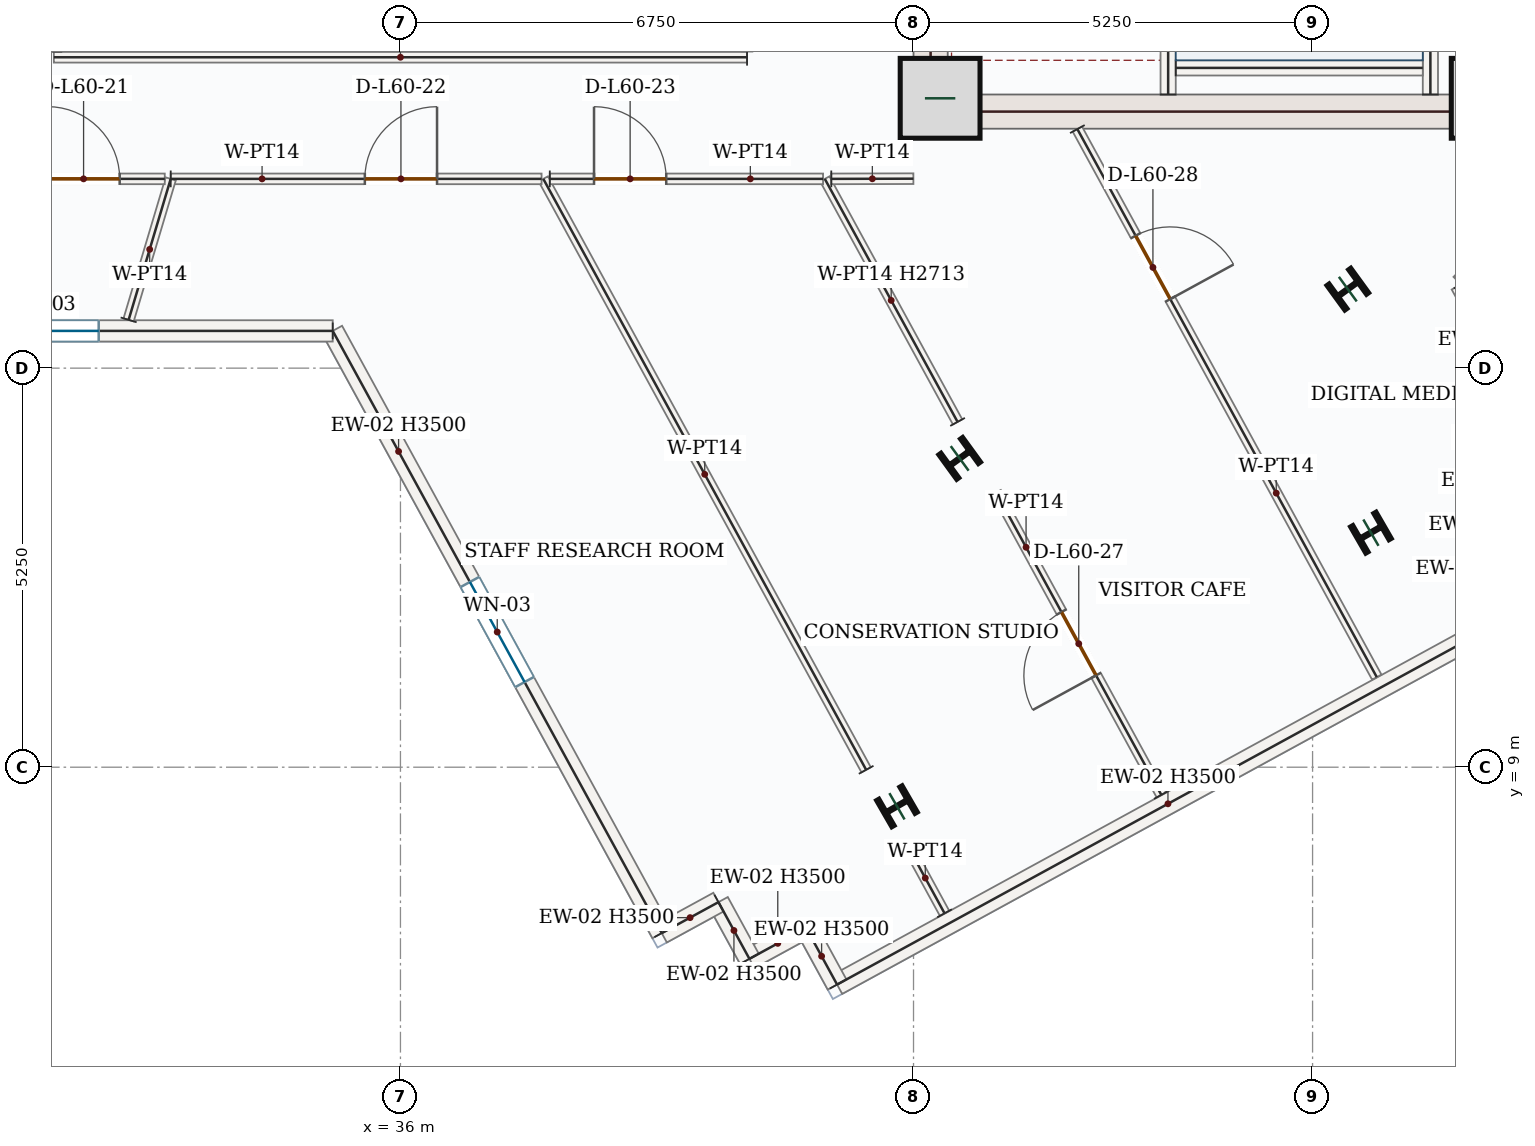
"""IFC4 building model, lengths in metres.
Left out: names, types, materials, properties, quantities, classifications, styles, units other than length and angle.
Written with IfcOpenShell. Run it as: python <this file> out.ifc"""

import sys

from ifc_helpers import new_model, si_unit, direction, frame, frame_2d, origin, origin_2d, place, context, subcontext, project, spatial, rectangle, i_section, extrude, source, transform, mapped, element, fill, save


model = new_model("IFC4")
c1 = context("Model", 3, precision=1e-05, world=origin(), true_north=direction((0.0, 1.0)))
c2 = subcontext(c1, "Body", "Model", "MODEL_VIEW")
j1 = project(units=[si_unit("LENGTHUNIT", "METRE"), si_unit("PLANEANGLEUNIT", "RADIAN")], contexts=[c1])
p1 = place(None, origin())
s1 = spatial("IfcSite", under=j1, at=p1, CompositionType="ELEMENT")
p2 = place(p1, origin())
s2 = spatial("IfcBuilding", under=s1, at=p2, CompositionType="ELEMENT")
p3 = place(p2, frame((0.0, 0.0, 254.1)))
s3 = spatial("IfcBuildingStorey", under=s2, at=p3, CompositionType="ELEMENT", Elevation=254.1)
p4 = place(p3, frame((42.975, 17.4, 0.0), z_axis=(0.0, 0.0, 1.0), x_axis=(0.0, 1.0, 0.0)))
e1 = element("IfcWall", 1, at=p4, inside=s3, PredefinedType="SHEAR", context=c2, shape_type="SweptSolid", body=[
    extrude(rectangle(XDim=8.55, YDim=0.45, at=frame_2d((4.275, 0.0))), origin(), (0.0, 0.0, 1.0), 3.5),
])
p5 = place(p4, frame((6.65, 0.0, 0.0)))
e2 = element("IfcOpeningElement", 2, at=p5, cuts=e1, PredefinedType="OPENING", context=c2, shape_type="SweptSolid", body=[
    extrude(rectangle(XDim=1.1, YDim=2.2, at=frame_2d((0.55, 1.1))), frame((0.0, 0.235, 0.0), z_axis=(0.0, -1.0, 0.0), x_axis=(1.0, 0.0, 0.0)), (0.0, 0.0, 1.0), 0.47),
])
p6 = place(p4, frame((1.75, 0.0, 0.0)))
e3 = element("IfcOpeningElement", 3, at=p6, cuts=e1, PredefinedType="OPENING", context=c2, shape_type="SweptSolid", body=[
    extrude(rectangle(XDim=1.3, YDim=2.2, at=frame_2d((0.65, 1.1))), frame((0.0, 0.235, 0.0), z_axis=(0.0, -1.0, 0.0), x_axis=(1.0, 0.0, 0.0)), (0.0, 0.0, 1.0), 0.47),
])
p7 = place(p4, frame((4.55, 0.0, 0.0)))
e4 = element("IfcOpeningElement", 4, at=p7, cuts=e1, PredefinedType="OPENING", context=c2, shape_type="SweptSolid", body=[
    extrude(rectangle(XDim=0.88, YDim=2.1, at=frame_2d((0.44, 1.05))), frame((0.0, 0.235, 0.0), z_axis=(0.0, -1.0, 0.0), x_axis=(1.0, 0.0, 0.0)), (0.0, 0.0, 1.0), 0.47),
])
m1 = source(origin(), c2, "Body", "SweptSolid", [
    extrude(rectangle(XDim=7.1, YDim=0.45, at=frame_2d((3.55, 0.0))), origin(), (0.0, 0.0, 1.0), 3.5),
])
p8 = place(p3, frame((43.2, 17.625, 0.0), z_axis=(0.0, 0.0, 1.0), x_axis=(1.0, 0.0, 0.0)))
e5 = element("IfcWall", 5, at=p8, inside=s3, PredefinedType="SHEAR", context=c2, shape_type="MappedRepresentation", body=[
    mapped(m1, transform((0.0, 0.0, 0.0), x_axis=(1.0, 0.0, 0.0), y_axis=(0.0, 1.0, 0.0), z_axis=(0.0, 0.0, 1.0), scale=1.0)),
])
m2 = source(origin(), c2, "Body", "SweptSolid", [
    extrude(rectangle(XDim=1.05, YDim=1.05, at=origin_2d()), origin(), (0.0, 0.0, 1.0), 3.75),
])
for number, where, z_axis, x_axis in (
    (6, (43.1, 17.8, 0.0), (0.0, 0.0, 1.0), (1.0, 0.0, 0.0)),
    (7, (50.35, 17.8, 0.0), (0.0, 0.0, 1.0), (1.0, 0.0, 0.0)),
):
    element("IfcColumn", number, at=place(p3, frame(where, z_axis=z_axis, x_axis=x_axis)), inside=s3, PredefinedType="COLUMN", context=c2, shape_type="MappedRepresentation", body=[
        mapped(m2, transform((0.0, 0.0, 0.0), x_axis=(1.0, 0.0, 0.0), y_axis=(0.0, 1.0, 0.0), z_axis=(0.0, 0.0, 1.0), scale=1.0)),
    ])
m3 = source(origin(), c2, "Body", "SweptSolid", [
    extrude(i_section(OverallWidth=0.399, OverallDepth=0.386, WebThickness=0.021, FlangeThickness=0.033, FilletRadius=0.018, at=origin_2d()), origin(), (0.0, 0.0, 1.0), 3.75),
])
for number, where, z_axis, x_axis in (
    (8, (43.357, 13.063, 0.0), (0.0, 0.0, 1.0), (-0.588, 0.809, 0.0)),
    (9, (48.464, 15.289, 0.0), (0.0, 0.0, 1.0), (-0.588, 0.809, 0.0)),
    (10, (42.532, 8.486, 0.0), (0.0, 0.0, 1.0), (-0.5, 0.866, 0.0)),
    (11, (48.768, 12.086, 0.0), (0.0, 0.0, 1.0), (-0.5, 0.866, 0.0)),
):
    element("IfcColumn", number, at=place(p3, frame(where, z_axis=z_axis, x_axis=x_axis)), inside=s3, PredefinedType="COLUMN", context=c2, shape_type="MappedRepresentation", body=[
        mapped(m3, transform((0.0, 0.0, 0.0), x_axis=(1.0, 0.0, 0.0), y_axis=(0.0, 1.0, 0.0), z_axis=(0.0, 0.0, 1.0), scale=1.0)),
    ])
p9 = place(p3, frame((53.06, 18.458, 0.0), z_axis=(0.0, 0.0, 1.0), x_axis=(-0.707106781187, -0.707106781187, 0.0)))
e12 = element("IfcWall", 12, at=p9, inside=s3, PredefinedType="SOLIDWALL", context=c2, shape_type="SweptSolid", body=[
    extrude(rectangle(XDim=4.394, YDim=0.28, at=frame_2d((2.197, 0.0))), origin(), (0.0, 0.0, 1.0), 3.5),
])
p10 = place(p9, frame((1.447, 0.0, 0.85)))
e13 = element("IfcOpeningElement", 13, at=p10, cuts=e12, PredefinedType="OPENING", context=c2, shape_type="SweptSolid", body=[
    extrude(rectangle(XDim=1.5, YDim=1.5, at=frame_2d((0.75, 0.75))), frame((0.0, 0.15, 0.0), z_axis=(0.0, -1.0, 0.0), x_axis=(1.0, 0.0, 0.0)), (0.0, 0.0, 1.0), 0.3),
])
m4 = source(origin(), c2, "Body", "SweptSolid", [
    extrude(rectangle(XDim=2.448, YDim=0.28, at=frame_2d((1.224, 0.0))), origin(), (0.0, 0.0, 1.0), 3.5),
])
p11 = place(p3, frame((49.953, 15.351, 0.0), z_axis=(0.0, 0.0, 1.0), x_axis=(0.47951595933, -0.877533158774, 0.0)))
e14 = element("IfcWall", 14, at=p11, inside=s3, PredefinedType="SOLIDWALL", context=c2, shape_type="MappedRepresentation", body=[
    mapped(m4, transform((0.0, 0.0, 0.0), x_axis=(1.0, 0.0, 0.0), y_axis=(0.0, 1.0, 0.0), z_axis=(0.0, 0.0, 1.0), scale=1.0)),
])
m5 = source(origin(), c2, "Body", "SweptSolid", [
    extrude(rectangle(XDim=9.92, YDim=0.28, at=frame_2d((4.96, 0.0))), origin(), (0.0, 0.0, 1.0), 3.5),
])
p12 = place(p3, frame((50.45, 10.896, 0.0), z_axis=(0.0, 0.0, 1.0), x_axis=(-0.877572768104, -0.479443465574, 0.0)))
e15 = element("IfcWall", 15, at=p12, inside=s3, PredefinedType="SOLIDWALL", context=c2, shape_type="MappedRepresentation", body=[
    mapped(m5, transform((0.0, 0.0, 0.0), x_axis=(1.0, 0.0, 0.0), y_axis=(0.0, 1.0, 0.0), z_axis=(0.0, 0.0, 1.0), scale=1.0)),
])
m6 = source(origin(), c2, "Body", "SweptSolid", [
    extrude(rectangle(XDim=0.85, YDim=0.28, at=frame_2d((0.425, 0.0))), origin(), (0.0, 0.0, 1.0), 3.5),
])
for number, where, z_axis, x_axis in (
    (16, (41.745, 6.14, 0.0), (0.0, 0.0, 1.0), (-0.479, 0.878, 0.0)),
    (17, (41.337, 6.886, 0.0), (0.0, 0.0, 1.0), (-0.878, -0.479, 0.0)),
):
    element("IfcWall", number, at=place(p3, frame(where, z_axis=z_axis, x_axis=x_axis)), inside=s3, PredefinedType="SOLIDWALL", context=c2, shape_type="MappedRepresentation", body=[
        mapped(m6, transform((0.0, 0.0, 0.0), x_axis=(1.0, 0.0, 0.0), y_axis=(0.0, 1.0, 0.0), z_axis=(0.0, 0.0, 1.0), scale=1.0)),
    ])
m7 = source(origin(), c2, "Body", "SweptSolid", [
    extrude(rectangle(XDim=0.85, YDim=0.28, at=frame_2d((0.425, 0.0))), origin(), (0.0, 0.0, 1.0), 3.5),
])
p13 = place(p3, frame((40.591, 6.479, 0.0), z_axis=(0.0, 0.0, 1.0), x_axis=(-0.479656876283, 0.877456141943, 0.0)))
e18 = element("IfcWall", 18, at=p13, inside=s3, PredefinedType="SOLIDWALL", context=c2, shape_type="MappedRepresentation", body=[
    mapped(m7, transform((0.0, 0.0, 0.0), x_axis=(1.0, 0.0, 0.0), y_axis=(0.0, 1.0, 0.0), z_axis=(0.0, 0.0, 1.0), scale=1.0)),
])
p14 = place(p3, frame((40.184, 7.225, 0.0), z_axis=(0.0, 0.0, 1.0), x_axis=(-0.877577015132, -0.479435691737, 0.0)))
e19 = element("IfcWall", 19, at=p14, inside=s3, PredefinedType="SOLIDWALL", context=c2, shape_type="MappedRepresentation", body=[
    mapped(m6, transform((0.0, 0.0, 0.0), x_axis=(1.0, 0.0, 0.0), y_axis=(0.0, 1.0, 0.0), z_axis=(0.0, 0.0, 1.0), scale=1.0)),
])
p15 = place(p3, frame((39.438, 6.817, 0.0), z_axis=(0.0, 0.0, 1.0), x_axis=(-0.479475345647, 0.877555350344, 0.0)))
e20 = element("IfcWall", 20, at=p15, inside=s3, PredefinedType="SOLIDWALL", context=c2, shape_type="SweptSolid", body=[
    extrude(rectangle(XDim=9.028, YDim=0.28, at=frame_2d((4.514, 0.0))), origin(), (0.0, 0.0, 1.0), 3.5),
])
p16 = place(p15, frame((3.764, 0.0, 0.85)))
e21 = element("IfcOpeningElement", 21, at=p16, cuts=e20, PredefinedType="OPENING", context=c2, shape_type="SweptSolid", body=[
    extrude(rectangle(XDim=1.5, YDim=1.5, at=frame_2d((0.75, 0.75))), frame((0.0, 0.15, 0.0), z_axis=(0.0, -1.0, 0.0), x_axis=(1.0, 0.0, 0.0)), (0.0, 0.0, 1.0), 0.3),
])
p17 = place(p3, frame((35.109, 14.74, 0.0), z_axis=(0.0, 0.0, 1.0), x_axis=(-1.0, 0.0, 0.0)))
e22 = element("IfcWall", 22, at=p17, inside=s3, PredefinedType="SOLIDWALL", context=c2, shape_type="SweptSolid", body=[
    extrude(rectangle(XDim=7.658, YDim=0.28, at=frame_2d((3.829, 0.0))), origin(), (0.0, 0.0, 1.0), 2.772),
])
p18 = place(p17, frame((3.079, 0.0, 0.85)))
e23 = element("IfcOpeningElement", 23, at=p18, cuts=e22, PredefinedType="OPENING", context=c2, shape_type="SweptSolid", body=[
    extrude(rectangle(XDim=1.5, YDim=1.5, at=frame_2d((0.75, 0.75))), frame((0.0, 0.15, 0.0), z_axis=(0.0, -1.0, 0.0), x_axis=(1.0, 0.0, 0.0)), (0.0, 0.0, 1.0), 0.3),
])
m8 = source(origin(), c2, "Body", "SweptSolid", [
    extrude(rectangle(XDim=7.87, YDim=0.2, at=frame_2d((3.935, 0.0))), origin(), (0.0, 0.0, 1.0), 3.5),
])
p19 = place(p3, frame((49.55, 17.85, 0.0), z_axis=(0.0, 0.0, 1.0), x_axis=(0.0, 1.0, 0.0)))
e24 = element("IfcWall", 24, at=p19, inside=s3, PredefinedType="SOLIDWALL", context=c2, shape_type="MappedRepresentation", body=[
    mapped(m8, transform((0.0, 0.0, 0.0), x_axis=(1.0, 0.0, 0.0), y_axis=(0.0, 1.0, 0.0), z_axis=(0.0, 0.0, 1.0), scale=1.0)),
])
p20 = place(p3, frame((46.1, 17.85, 0.0), z_axis=(0.0, 0.0, 1.0), x_axis=(0.0, 1.0, 0.0)))
e25 = element("IfcWall", 25, at=p20, inside=s3, PredefinedType="SOLIDWALL", context=c2, shape_type="SweptSolid", body=[
    extrude(rectangle(XDim=8.0, YDim=0.2, at=frame_2d((4.0, 0.0))), origin(), (0.0, 0.0, 1.0), 3.5),
])
p21 = place(p20, frame((6.3, 0.0, 0.0)))
e26 = element("IfcOpeningElement", 26, at=p21, cuts=e25, PredefinedType="OPENING", context=c2, shape_type="SweptSolid", body=[
    extrude(rectangle(XDim=1.05, YDim=2.15, at=frame_2d((0.525, 1.075))), frame((0.0, 0.11, 0.0), z_axis=(0.0, -1.0, 0.0), x_axis=(1.0, 0.0, 0.0)), (0.0, 0.0, 1.0), 0.22),
])
m9 = source(origin(), c2, "Body", "SweptSolid", [
    extrude(rectangle(XDim=3.25, YDim=0.2, at=frame_2d((1.625, 0.0))), origin(), (0.0, 0.0, 1.0), 3.5),
])
p22 = place(p3, frame((46.2, 18.2, 0.0), z_axis=(0.0, 0.0, 1.0), x_axis=(1.0, 0.0, 0.0)))
e27 = element("IfcWall", 27, at=p22, inside=s3, PredefinedType="SOLIDWALL", context=c2, shape_type="MappedRepresentation", body=[
    mapped(m9, transform((0.0, 0.0, 0.0), x_axis=(1.0, 0.0, 0.0), y_axis=(0.0, 1.0, 0.0), z_axis=(0.0, 0.0, 1.0), scale=1.0)),
])
p23 = place(p3, frame((44.906, 17.395, 0.0), z_axis=(0.0, 0.0, 1.0), x_axis=(0.479449534835, -0.877569452264, 0.0)))
e28 = element("IfcWall", 28, at=p23, inside=s3, PredefinedType="PARTITIONING", context=c2, shape_type="SweptSolid", body=[
    extrude(rectangle(XDim=8.216, YDim=0.14, at=frame_2d((4.108, 0.0))), origin(), (0.0, 0.0, 1.0), 3.5),
])
p24 = place(p23, frame((1.599, 0.0, 0.0)))
e29 = element("IfcOpeningElement", 29, at=p24, cuts=e28, PredefinedType="OPENING", context=c2, shape_type="SweptSolid", body=[
    extrude(rectangle(XDim=0.95, YDim=2.15, at=frame_2d((0.475, 1.075))), frame((0.0, 0.08, 0.0), z_axis=(0.0, -1.0, 0.0), x_axis=(1.0, 0.0, 0.0)), (0.0, 0.0, 1.0), 0.16),
])
p25 = place(p3, frame((46.01, 8.636, 0.0), z_axis=(0.0, 0.0, 1.0), x_axis=(-0.479410597023, 0.877590724348, 0.0)))
e30 = element("IfcWall", 30, at=p25, inside=s3, PredefinedType="PARTITIONING", context=c2, shape_type="SweptSolid", body=[
    extrude(rectangle(XDim=4.532, YDim=0.14, at=frame_2d((2.266, 0.0))), origin(), (0.0, 0.0, 1.0), 3.5),
])
p26 = place(p25, frame((1.791, 0.0, 0.0)))
e31 = element("IfcOpeningElement", 31, at=p26, cuts=e30, PredefinedType="OPENING", context=c2, shape_type="SweptSolid", body=[
    extrude(rectangle(XDim=0.95, YDim=2.15, at=frame_2d((0.475, 1.075))), frame((0.0, 0.08, 0.0), z_axis=(0.0, -1.0, 0.0), x_axis=(1.0, 0.0, 0.0)), (0.0, 0.0, 1.0), 0.16),
])
m10 = source(origin(), c2, "Body", "SweptSolid", [
    extrude(rectangle(XDim=3.643, YDim=0.14, at=frame_2d((1.822, 0.0))), origin(), (0.0, 0.0, 1.0), 2.713),
])
p27 = place(p3, frame((43.33, 13.543, 0.0), z_axis=(0.0, 0.0, 1.0), x_axis=(-0.479434255723, 0.87757779965, 0.0)))
e32 = element("IfcWall", 32, at=p27, inside=s3, PredefinedType="PARTITIONING", context=c2, shape_type="MappedRepresentation", body=[
    mapped(m10, transform((0.0, 0.0, 0.0), x_axis=(1.0, 0.0, 0.0), y_axis=(0.0, 1.0, 0.0), z_axis=(0.0, 0.0, 1.0), scale=1.0)),
])
m11 = source(origin(), c2, "Body", "SweptSolid", [
    extrude(rectangle(XDim=1.08, YDim=0.14, at=frame_2d((0.54, 0.0))), origin(), (0.0, 0.0, 1.0), 3.5),
])
p28 = place(p3, frame((41.668, 16.74, 0.0), z_axis=(0.0, 0.0, 1.0), x_axis=(0.999996908828, 0.002486429927, 0.0)))
e33 = element("IfcWall", 33, at=p28, inside=s3, PredefinedType="PARTITIONING", context=c2, shape_type="MappedRepresentation", body=[
    mapped(m11, transform((0.0, 0.0, 0.0), x_axis=(1.0, 0.0, 0.0), y_axis=(0.0, 1.0, 0.0), z_axis=(0.0, 0.0, 1.0), scale=1.0)),
])
m12 = source(origin(), c2, "Body", "SweptSolid", [
    extrude(rectangle(XDim=8.859, YDim=0.14, at=frame_2d((4.429, 0.0))), origin(), (0.0, 0.0, 1.0), 3.5),
])
p29 = place(p3, frame((42.127, 8.966, 0.0), z_axis=(0.0, 0.0, 1.0), x_axis=(-0.479448669569, 0.877569924991, 0.0)))
e34 = element("IfcWall", 34, at=p29, inside=s3, PredefinedType="PARTITIONING", context=c2, shape_type="MappedRepresentation", body=[
    mapped(m12, transform((0.0, 0.0, 0.0), x_axis=(1.0, 0.0, 0.0), y_axis=(0.0, 1.0, 0.0), z_axis=(0.0, 0.0, 1.0), scale=1.0)),
])
p30 = place(p3, frame((37.965, 16.74, 0.0), z_axis=(0.0, 0.0, 1.0), x_axis=(1.0, 0.0, 0.0)))
e35 = element("IfcWall", 35, at=p30, inside=s3, PredefinedType="PARTITIONING", context=c2, shape_type="SweptSolid", body=[
    extrude(rectangle(XDim=3.595, YDim=0.14, at=frame_2d((1.798, 0.0))), origin(), (0.0, 0.0, 1.0), 3.5),
])
p31 = place(p30, frame((0.582, 0.0, 0.0)))
e36 = element("IfcOpeningElement", 36, at=p31, cuts=e35, PredefinedType="OPENING", context=c2, shape_type="SweptSolid", body=[
    extrude(rectangle(XDim=0.95, YDim=2.15, at=frame_2d((0.475, 1.075))), frame((0.0, 0.08, 0.0), z_axis=(0.0, -1.0, 0.0), x_axis=(1.0, 0.0, 0.0)), (0.0, 0.0, 1.0), 0.16),
])
m13 = source(origin(), c2, "Body", "SweptSolid", [
    extrude(rectangle(XDim=1.057, YDim=0.14, at=frame_2d((0.529, 0.0))), origin(), (0.0, 0.0, 1.0), 3.5),
])
p32 = place(p3, frame((43.158, 7.078, 0.0), z_axis=(0.0, 0.0, 1.0), x_axis=(-0.479434527366, 0.877577651248, 0.0)))
e37 = element("IfcWall", 37, at=p32, inside=s3, PredefinedType="PARTITIONING", context=c2, shape_type="MappedRepresentation", body=[
    mapped(m13, transform((0.0, 0.0, 0.0), x_axis=(1.0, 0.0, 0.0), y_axis=(0.0, 1.0, 0.0), z_axis=(0.0, 0.0, 1.0), scale=1.0)),
])
p33 = place(p3, frame((32.978, 16.74, 0.0), z_axis=(0.0, 0.0, 1.0), x_axis=(1.0, 0.0, 0.0)))
e38 = element("IfcWall", 38, at=p33, inside=s3, PredefinedType="PARTITIONING", context=c2, shape_type="SweptSolid", body=[
    extrude(rectangle(XDim=4.879, YDim=0.14, at=frame_2d((2.439, 0.0))), origin(), (0.0, 0.0, 1.0), 3.5),
])
p34 = place(p33, frame((2.554, 0.0, 0.0)))
e39 = element("IfcOpeningElement", 39, at=p34, cuts=e38, PredefinedType="OPENING", context=c2, shape_type="SweptSolid", body=[
    extrude(rectangle(XDim=0.95, YDim=2.15, at=frame_2d((0.475, 1.075))), frame((0.0, 0.08, 0.0), z_axis=(0.0, -1.0, 0.0), x_axis=(1.0, 0.0, 0.0)), (0.0, 0.0, 1.0), 0.16),
])
m14 = source(origin(), c2, "Body", "SweptSolid", [
    extrude(rectangle(XDim=1.936, YDim=0.14, at=frame_2d((0.968, 0.0))), origin(), (0.0, 0.0, 1.0), 3.5),
])
p35 = place(p3, frame((32.424, 14.885, 0.0), z_axis=(0.0, 0.0, 1.0), x_axis=(0.286028613148, 0.958221077028, 0.0)))
e40 = element("IfcWall", 40, at=p35, inside=s3, PredefinedType="PARTITIONING", context=c2, shape_type="MappedRepresentation", body=[
    mapped(m14, transform((0.0, 0.0, 0.0), x_axis=(1.0, 0.0, 0.0), y_axis=(0.0, 1.0, 0.0), z_axis=(0.0, 0.0, 1.0), scale=1.0)),
])
p36 = place(p3, frame((29.253, 16.741, 0.0), z_axis=(0.0, 0.0, 1.0), x_axis=(0.999999943952, -0.000334806463, 0.0)))
e41 = element("IfcWall", 41, at=p36, inside=s3, PredefinedType="PARTITIONING", context=c2, shape_type="SweptSolid", body=[
    extrude(rectangle(XDim=3.646, YDim=0.14, at=frame_2d((1.823, 0.0))), origin(), (0.0, 0.0, 1.0), 3.5),
])
p37 = place(p36, frame((2.103, 0.0, 0.0)))
e42 = element("IfcOpeningElement", 42, at=p37, cuts=e41, PredefinedType="OPENING", context=c2, shape_type="SweptSolid", body=[
    extrude(rectangle(XDim=0.95, YDim=2.15, at=frame_2d((0.475, 1.075))), frame((0.0, 0.08, 0.0), z_axis=(0.0, -1.0, 0.0), x_axis=(1.0, 0.0, 0.0)), (0.0, 0.0, 1.0), 0.16),
])
m15 = source(origin(), c2, "Body", "SweptSolid", [
    extrude(rectangle(XDim=9.12, YDim=0.14, at=frame_2d((4.56, 0.0))), origin(), (0.0, 0.0, 1.0), 3.5),
])
p38 = place(p3, frame((40.56, 18.34, 0.0), z_axis=(0.0, 0.0, 1.0), x_axis=(-1.0, 0.0, 0.0)))
e43 = element("IfcWall", 43, at=p38, inside=s3, PredefinedType="PARTITIONING", context=c2, shape_type="MappedRepresentation", body=[
    mapped(m15, transform((0.0, 0.0, 0.0), x_axis=(1.0, 0.0, 0.0), y_axis=(0.0, 1.0, 0.0), z_axis=(0.0, 0.0, 1.0), scale=1.0)),
])
m16 = source(origin(), c2, "Body", "SweptSolid", [
    extrude(rectangle(XDim=1.5, YDim=1.5, at=frame_2d((0.75, 0.75))), frame((0.0, 0.03, 0.0), z_axis=(0.0, -1.0, 0.0), x_axis=(1.0, 0.0, 0.0)), (0.0, 0.0, 1.0), 0.06),
])
p39 = place(p16, origin())
e44 = element("IfcWindow", 44, at=p39, inside=s3, PartitioningType="SINGLE_PANEL", PredefinedType="WINDOW", context=c2, shape_type="MappedRepresentation", body=[
    mapped(m16, transform((0.0, 0.0, 0.0), x_axis=(1.0, 0.0, 0.0), y_axis=(0.0, 1.0, 0.0), z_axis=(0.0, 0.0, 1.0), scale=1.0)),
])
fill(e21, e44)
p40 = place(p18, origin())
e45 = element("IfcWindow", 45, at=p40, inside=s3, PartitioningType="SINGLE_PANEL", PredefinedType="WINDOW", context=c2, shape_type="MappedRepresentation", body=[
    mapped(m16, transform((0.0, 0.0, 0.0), x_axis=(1.0, 0.0, 0.0), y_axis=(0.0, 1.0, 0.0), z_axis=(0.0, 0.0, 1.0), scale=1.0)),
])
fill(e23, e45)
m17 = source(origin(), c2, "Body", "SweptSolid", [
    extrude(rectangle(XDim=0.95, YDim=2.15, at=frame_2d((0.475, 1.075))), frame((0.0, 0.025, 0.0), z_axis=(0.0, -1.0, 0.0), x_axis=(1.0, 0.0, 0.0)), (0.0, 0.0, 1.0), 0.05),
])
p41 = place(p37, origin())
e46 = element("IfcDoor", 46, at=p41, inside=s3, OperationType="SINGLE_SWING_LEFT", PredefinedType="DOOR", context=c2, shape_type="MappedRepresentation", body=[
    mapped(m17, transform((0.0, 0.0, 0.0), x_axis=(1.0, 0.0, 0.0), y_axis=(0.0, 1.0, 0.0), z_axis=(0.0, 0.0, 1.0), scale=1.0)),
])
fill(e42, e46)
p42 = place(p34, origin())
e47 = element("IfcDoor", 47, at=p42, inside=s3, OperationType="SINGLE_SWING_RIGHT", PredefinedType="DOOR", context=c2, shape_type="MappedRepresentation", body=[
    mapped(m17, transform((0.0, 0.0, 0.0), x_axis=(1.0, 0.0, 0.0), y_axis=(0.0, 1.0, 0.0), z_axis=(0.0, 0.0, 1.0), scale=1.0)),
])
fill(e39, e47)
p43 = place(p31, origin())
e48 = element("IfcDoor", 48, at=p43, inside=s3, OperationType="SINGLE_SWING_LEFT", PredefinedType="DOOR", context=c2, shape_type="MappedRepresentation", body=[
    mapped(m17, transform((0.0, 0.0, 0.0), x_axis=(1.0, 0.0, 0.0), y_axis=(0.0, 1.0, 0.0), z_axis=(0.0, 0.0, 1.0), scale=1.0)),
])
fill(e36, e48)
p44 = place(p26, origin())
e49 = element("IfcDoor", 49, at=p44, inside=s3, OperationType="SINGLE_SWING_LEFT", PredefinedType="DOOR", context=c2, shape_type="MappedRepresentation", body=[
    mapped(m17, transform((0.0, 0.0, 0.0), x_axis=(1.0, 0.0, 0.0), y_axis=(0.0, 1.0, 0.0), z_axis=(0.0, 0.0, 1.0), scale=1.0)),
])
fill(e31, e49)
p45 = place(p24, origin())
e50 = element("IfcDoor", 50, at=p45, inside=s3, OperationType="SINGLE_SWING_RIGHT", PredefinedType="DOOR", context=c2, shape_type="MappedRepresentation", body=[
    mapped(m17, transform((0.0, 0.0, 0.0), x_axis=(1.0, 0.0, 0.0), y_axis=(0.0, 1.0, 0.0), z_axis=(0.0, 0.0, 1.0), scale=1.0)),
])
fill(e29, e50)
save(model, sys.argv[1])
